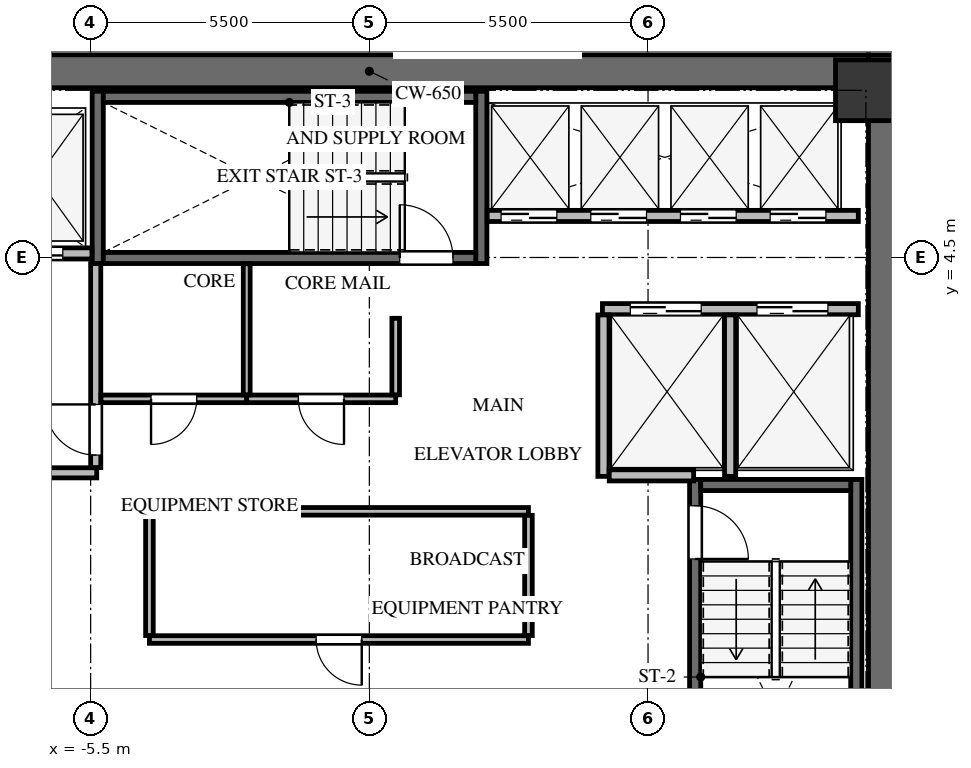
"""IFC4 building model, lengths in metres.
Left out: names, types, materials, properties, quantities, classifications, styles, units other than length and angle.
Written with IfcOpenShell. Run it as: python <this file> out.ifc"""

import sys

from ifc_helpers import new_model, si_unit, direction, frame, frame_2d, origin, origin_2d, place, context, subcontext, project, spatial, rectangle, extrude, source, transform, mapped, element, fill, save


model = new_model("IFC4")
c1 = context("Model", 3, precision=1e-05, world=origin(), true_north=direction((0.0, 1.0)))
c2 = subcontext(c1, "Body", "Model", "MODEL_VIEW")
j1 = project(units=[si_unit("LENGTHUNIT", "METRE"), si_unit("PLANEANGLEUNIT", "RADIAN")], contexts=[c1])
p1 = place(None, origin())
s1 = spatial("IfcSite", under=j1, at=p1, CompositionType="ELEMENT")
p2 = place(p1, origin())
s2 = spatial("IfcBuilding", under=s1, at=p2, CompositionType="ELEMENT")
p3 = place(p2, frame((0.0, 0.0, 200.2)))
s3 = spatial("IfcBuildingStorey", under=s2, at=p3, CompositionType="ELEMENT", Elevation=200.2)
p4 = place(p3, frame((10.175, -8.5, 0.0), z_axis=(0.0, 0.0, 1.0), x_axis=(0.0, 1.0, 0.0)))
e1 = element("IfcWall", 1, at=p4, inside=s3, PredefinedType="SHEAR", context=c2, shape_type="SweptSolid", body=[
    extrude(rectangle(XDim=17.0, YDim=0.65, at=frame_2d((8.5, 0.0))), origin(), (0.0, 0.0, 1.0), 3.0),
])
p5 = place(p3, frame((-9.85, 8.175, 0.0), z_axis=(0.0, 0.0, 1.0), x_axis=(1.0, 0.0, 0.0)))
e2 = element("IfcWall", 2, at=p5, inside=s3, PredefinedType="SHEAR", context=c2, shape_type="SweptSolid", body=[
    extrude(rectangle(XDim=19.7, YDim=0.65, at=frame_2d((9.85, 0.0))), origin(), (0.0, 0.0, 1.0), 3.0),
])
p6 = place(p3, frame((9.61, -7.77, -0.24), z_axis=(0.0, 0.0, 1.0), x_axis=(0.0, 1.0, 0.0)))
e3 = element("IfcWall", 3, at=p6, inside=s3, PredefinedType="SHEAR", context=c2, shape_type="SweptSolid", body=[
    extrude(rectangle(XDim=7.89, YDim=0.22, at=frame_2d((3.945, 0.0))), origin(), (0.0, 0.0, 1.0), 3.0),
])
p7 = place(p3, frame((6.43, 0.12, -0.24), z_axis=(0.0, 0.0, 1.0), x_axis=(0.0, -1.0, 0.0)))
e4 = element("IfcWall", 4, at=p7, inside=s3, PredefinedType="SHEAR", context=c2, shape_type="SweptSolid", body=[
    extrude(rectangle(XDim=7.89, YDim=0.22, at=frame_2d((3.945, 0.0))), origin(), (0.0, 0.0, 1.0), 3.0),
])
p8 = place(p7, frame((0.52, 0.0, 0.0)))
e5 = element("IfcOpeningElement", 5, at=p8, cuts=e4, PredefinedType="OPENING", context=c2, shape_type="SweptSolid", body=[
    extrude(rectangle(XDim=1.05, YDim=2.15, at=frame_2d((0.525, 1.075))), frame((0.0, 0.12, 0.0), z_axis=(0.0, -1.0, 0.0), x_axis=(1.0, 0.0, 0.0)), (0.0, 0.0, 1.0), 0.24),
])
p9 = place(p3, frame((9.5, 0.01, -0.24), z_axis=(0.0, 0.0, 1.0), x_axis=(-1.0, 0.0, 0.0)))
e6 = element("IfcWall", 6, at=p9, inside=s3, PredefinedType="SHEAR", context=c2, shape_type="SweptSolid", body=[
    extrude(rectangle(XDim=2.96, YDim=0.22, at=frame_2d((1.48, 0.0))), origin(), (0.0, 0.0, 1.0), 3.0),
])
for number, where, z_axis, x_axis in (
    (7, (2.21, 4.38, -0.24), (0.0, 0.0, 1.0), (0.0, 1.0, 0.0)),
    (8, (-5.36, 7.78, -0.24), (0.0, 0.0, 1.0), (0.0, -1.0, 0.0)),
):
    element("IfcWall", number, at=place(p3, frame(where, z_axis=z_axis, x_axis=x_axis)), inside=s3, PredefinedType="SHEAR", context=c2, shape_type="SweptSolid", body=[
        extrude(rectangle(XDim=3.4, YDim=0.22, at=frame_2d((1.7, 0.0))), origin(), (0.0, 0.0, 1.0), 3.0),
    ])
p10 = place(p3, frame((-5.25, 4.49, -0.24), z_axis=(0.0, 0.0, 1.0), x_axis=(1.0, 0.0, 0.0)))
e9 = element("IfcWall", 9, at=p10, inside=s3, PredefinedType="SHEAR", context=c2, shape_type="SweptSolid", body=[
    extrude(rectangle(XDim=7.35, YDim=0.22, at=frame_2d((3.675, 0.0))), origin(), (0.0, 0.0, 1.0), 3.0),
])
p11 = place(p10, frame((5.85, 0.0, 0.0)))
e10 = element("IfcOpeningElement", 10, at=p11, cuts=e9, PredefinedType="OPENING", context=c2, shape_type="SweptSolid", body=[
    extrude(rectangle(XDim=1.05, YDim=2.15, at=frame_2d((0.525, 1.075))), frame((0.0, 0.12, 0.0), z_axis=(0.0, -1.0, 0.0), x_axis=(1.0, 0.0, 0.0)), (0.0, 0.0, 1.0), 0.24),
])
p12 = place(p3, frame((2.1, 7.67, -0.24), z_axis=(0.0, 0.0, 1.0), x_axis=(-1.0, 0.0, 0.0)))
e11 = element("IfcWall", 11, at=p12, inside=s3, PredefinedType="SHEAR", context=c2, shape_type="SweptSolid", body=[
    extrude(rectangle(XDim=7.35, YDim=0.22, at=frame_2d((3.675, 0.0))), origin(), (0.0, 0.0, 1.0), 3.0),
])
m1 = source(origin(), c2, "Body", "SweptSolid", [
    extrude(rectangle(XDim=1.2, YDim=1.2, at=origin_2d()), origin(), (0.0, 0.0, 1.0), 3.0),
])
p13 = place(p3, frame((9.8, 7.8, -0.24), z_axis=(0.0, 0.0, 1.0), x_axis=(1.0, 0.0, 0.0)))
e12 = element("IfcColumn", 12, at=p13, inside=s3, PredefinedType="COLUMN", context=c2, shape_type="MappedRepresentation", body=[
    mapped(m1, transform((0.0, 0.0, 0.0), x_axis=(1.0, 0.0, 0.0), y_axis=(0.0, 1.0, 0.0), z_axis=(0.0, 0.0, 1.0), scale=1.0)),
])
p14 = place(p3, frame((-9.65, 4.58, 0.0), z_axis=(0.0, 0.0, 1.0), x_axis=(1.0, 0.0, 0.0)))
e13 = element("IfcWall", 13, at=p14, inside=s3, PredefinedType="SOLIDWALL", context=c2, shape_type="SweptSolid", body=[
    extrude(rectangle(XDim=4.175, YDim=0.22, at=frame_2d((2.087, 0.0))), origin(), (0.0, 0.0, 1.0), 2.745),
])
p15 = place(p14, frame((0.4, 0.0, 0.0)))
e14 = element("IfcOpeningElement", 14, at=p15, cuts=e13, PredefinedType="OPENING", context=c2, shape_type="SweptSolid", body=[
    extrude(rectangle(XDim=1.2, YDim=2.15, at=frame_2d((0.6, 1.075))), frame((0.0, 0.12, 0.0), z_axis=(0.0, -1.0, 0.0), x_axis=(1.0, 0.0, 0.0)), (0.0, 0.0, 1.0), 0.24),
])
p16 = place(p14, frame((2.4, 0.0, 0.0)))
e15 = element("IfcOpeningElement", 15, at=p16, cuts=e13, PredefinedType="OPENING", context=c2, shape_type="SweptSolid", body=[
    extrude(rectangle(XDim=1.2, YDim=2.15, at=frame_2d((0.6, 1.075))), frame((0.0, 0.12, 0.0), z_axis=(0.0, -1.0, 0.0), x_axis=(1.0, 0.0, 0.0)), (0.0, 0.0, 1.0), 0.24),
])
p17 = place(p3, frame((-9.65, 0.25, 0.0), z_axis=(0.0, 0.0, 1.0), x_axis=(1.0, 0.0, 0.0)))
e16 = element("IfcWall", 16, at=p17, inside=s3, PredefinedType="SOLIDWALL", context=c2, shape_type="SweptSolid", body=[
    extrude(rectangle(XDim=4.27, YDim=0.2, at=frame_2d((2.135, 0.0))), origin(), (0.0, 0.0, 1.0), 2.745),
])
p18 = place(p3, frame((-5.4, 0.354, 0.0), z_axis=(0.0, 0.0, 1.0), x_axis=(0.0, 1.0, 0.0)))
e17 = element("IfcWall", 17, at=p18, inside=s3, PredefinedType="SOLIDWALL", context=c2, shape_type="SweptSolid", body=[
    extrude(rectangle(XDim=4.026, YDim=0.2, at=frame_2d((2.013, 0.0))), origin(), (0.0, 0.0, 1.0), 2.745),
])
p19 = place(p18, frame((0.246, 0.0, 0.0)))
e18 = element("IfcOpeningElement", 18, at=p19, cuts=e17, PredefinedType="OPENING", context=c2, shape_type="SweptSolid", body=[
    extrude(rectangle(XDim=1.0, YDim=2.15, at=frame_2d((0.5, 1.075))), frame((0.0, 0.11, 0.0), z_axis=(0.0, -1.0, 0.0), x_axis=(1.0, 0.0, 0.0)), (0.0, 0.0, 1.0), 0.22),
])
p20 = place(p3, frame((4.6, 3.48, 0.0), z_axis=(0.0, 0.0, 1.0), x_axis=(1.0, 0.0, 0.0)))
e19 = element("IfcWall", 19, at=p20, inside=s3, PredefinedType="SOLIDWALL", context=c2, shape_type="SweptSolid", body=[
    extrude(rectangle(XDim=5.05, YDim=0.22, at=frame_2d((2.525, 0.0))), origin(), (0.0, 0.0, 1.0), 2.745),
])
p21 = place(p20, frame((0.55, 0.0, 0.0)))
e20 = element("IfcOpeningElement", 20, at=p21, cuts=e19, PredefinedType="OPENING", context=c2, shape_type="SweptSolid", body=[
    extrude(rectangle(XDim=1.4, YDim=2.15, at=frame_2d((0.7, 1.075))), frame((0.0, 0.12, 0.0), z_axis=(0.0, -1.0, 0.0), x_axis=(1.0, 0.0, 0.0)), (0.0, 0.0, 1.0), 0.24),
])
p22 = place(p20, frame((3.05, 0.0, 0.0)))
e21 = element("IfcOpeningElement", 21, at=p22, cuts=e19, PredefinedType="OPENING", context=c2, shape_type="SweptSolid", body=[
    extrude(rectangle(XDim=1.4, YDim=2.15, at=frame_2d((0.7, 1.075))), frame((0.0, 0.12, 0.0), z_axis=(0.0, -1.0, 0.0), x_axis=(1.0, 0.0, 0.0)), (0.0, 0.0, 1.0), 0.24),
])
for number, where, z_axis, x_axis in (
    (22, (4.62, 0.18, 0.0), (0.0, 0.0, 1.0), (0.0, 1.0, 0.0)),
    (23, (7.12, 0.18, 0.0), (0.0, 0.0, 1.0), (0.0, 1.0, 0.0)),
):
    element("IfcWall", number, at=place(p3, frame(where, z_axis=z_axis, x_axis=x_axis)), inside=s3, PredefinedType="SOLIDWALL", context=c2, shape_type="SweptSolid", body=[
        extrude(rectangle(XDim=3.186, YDim=0.22, at=frame_2d((1.593, 0.0))), origin(), (0.0, 0.0, 1.0), 2.745),
    ])
p23 = place(p3, frame((4.734, 0.2, 0.0), z_axis=(0.0, 0.0, 1.0), x_axis=(1.0, 0.0, 0.0)))
e24 = element("IfcWall", 24, at=p23, inside=s3, PredefinedType="SOLIDWALL", context=c2, shape_type="SweptSolid", body=[
    extrude(rectangle(XDim=1.666, YDim=0.22, at=frame_2d((0.833, 0.0))), origin(), (0.0, 0.0, 1.0), 2.745),
])
p24 = place(p3, frame((2.325, 5.32, 0.0), z_axis=(0.0, 0.0, 1.0), x_axis=(1.0, 0.0, 0.0)))
e25 = element("IfcWall", 25, at=p24, inside=s3, PredefinedType="SOLIDWALL", context=c2, shape_type="SweptSolid", body=[
    extrude(rectangle(XDim=7.325, YDim=0.22, at=frame_2d((3.663, 0.0))), origin(), (0.0, 0.0, 1.0), 2.745),
])
p25 = place(p24, frame((0.275, 0.0, 0.0)))
e26 = element("IfcOpeningElement", 26, at=p25, cuts=e25, PredefinedType="OPENING", context=c2, shape_type="SweptSolid", body=[
    extrude(rectangle(XDim=1.1, YDim=2.15, at=frame_2d((0.55, 1.075))), frame((0.0, 0.12, 0.0), z_axis=(0.0, -1.0, 0.0), x_axis=(1.0, 0.0, 0.0)), (0.0, 0.0, 1.0), 0.24),
])
p26 = place(p24, frame((2.045, 0.0, 0.0)))
e27 = element("IfcOpeningElement", 27, at=p26, cuts=e25, PredefinedType="OPENING", context=c2, shape_type="SweptSolid", body=[
    extrude(rectangle(XDim=1.1, YDim=2.15, at=frame_2d((0.55, 1.075))), frame((0.0, 0.12, 0.0), z_axis=(0.0, -1.0, 0.0), x_axis=(1.0, 0.0, 0.0)), (0.0, 0.0, 1.0), 0.24),
])
p27 = place(p24, frame((3.815, 0.0, 0.0)))
e28 = element("IfcOpeningElement", 28, at=p27, cuts=e25, PredefinedType="OPENING", context=c2, shape_type="SweptSolid", body=[
    extrude(rectangle(XDim=1.1, YDim=2.15, at=frame_2d((0.55, 1.075))), frame((0.0, 0.12, 0.0), z_axis=(0.0, -1.0, 0.0), x_axis=(1.0, 0.0, 0.0)), (0.0, 0.0, 1.0), 0.24),
])
p28 = place(p24, frame((5.585, 0.0, 0.0)))
e29 = element("IfcOpeningElement", 29, at=p28, cuts=e25, PredefinedType="OPENING", context=c2, shape_type="SweptSolid", body=[
    extrude(rectangle(XDim=1.1, YDim=2.15, at=frame_2d((0.55, 1.075))), frame((0.0, 0.12, 0.0), z_axis=(0.0, -1.0, 0.0), x_axis=(1.0, 0.0, 0.0)), (0.0, 0.0, 1.0), 0.24),
])
p29 = place(p3, frame((3.14, -3.04, 0.0), z_axis=(0.0, 0.0, 1.0), x_axis=(-1.0, 0.0, 0.0)))
e30 = element("IfcWall", 30, at=p29, inside=s3, PredefinedType="PARTITIONING", context=c2, shape_type="SweptSolid", body=[
    extrude(rectangle(XDim=7.48, YDim=0.15, at=frame_2d((3.74, 0.0))), origin(), (0.0, 0.0, 1.0), 2.745),
])
p30 = place(p29, frame((3.29, 0.0, 0.0)))
e31 = element("IfcOpeningElement", 31, at=p30, cuts=e30, PredefinedType="OPENING", context=c2, shape_type="SweptSolid", body=[
    extrude(rectangle(XDim=0.9, YDim=2.05, at=frame_2d((0.45, 1.025))), frame((0.0, 0.085, 0.0), z_axis=(0.0, -1.0, 0.0), x_axis=(1.0, 0.0, 0.0)), (0.0, 0.0, 1.0), 0.17),
])
p31 = place(p3, frame((-4.34, -0.51, 0.0), z_axis=(0.0, 0.0, 1.0), x_axis=(1.0, 0.0, 0.0)))
e32 = element("IfcWall", 32, at=p31, inside=s3, PredefinedType="PARTITIONING", context=c2, shape_type="SweptSolid", body=[
    extrude(rectangle(XDim=7.48, YDim=0.15, at=frame_2d((3.74, 0.0))), origin(), (0.0, 0.0, 1.0), 2.745),
])
for number, where, z_axis, x_axis in (
    (33, (-4.34, -2.961, 0.0), (0.0, 0.0, 1.0), (0.0, 1.0, 0.0)),
    (34, (3.14, -0.589, 0.0), (0.0, 0.0, 1.0), (0.0, -1.0, 0.0)),
):
    element("IfcWall", number, at=place(p3, frame(where, z_axis=z_axis, x_axis=x_axis)), inside=s3, PredefinedType="PARTITIONING", context=c2, shape_type="SweptSolid", body=[
        extrude(rectangle(XDim=2.372, YDim=0.15, at=frame_2d((1.186, 0.0))), origin(), (0.0, 0.0, 1.0), 2.745),
    ])
p32 = place(p3, frame((-2.42, 1.71, 0.0), z_axis=(0.0, 0.0, 1.0), x_axis=(-1.0, 0.0, 0.0)))
e35 = element("IfcWall", 35, at=p32, inside=s3, PredefinedType="PARTITIONING", context=c2, shape_type="SweptSolid", body=[
    extrude(rectangle(XDim=2.876, YDim=0.15, at=frame_2d((1.438, 0.0))), origin(), (0.0, 0.0, 1.0), 2.745),
])
p33 = place(p32, frame((0.988, 0.0, 0.0)))
e36 = element("IfcOpeningElement", 36, at=p33, cuts=e35, PredefinedType="OPENING", context=c2, shape_type="SweptSolid", body=[
    extrude(rectangle(XDim=0.9, YDim=2.05, at=frame_2d((0.45, 1.025))), frame((0.0, 0.085, 0.0), z_axis=(0.0, -1.0, 0.0), x_axis=(1.0, 0.0, 0.0)), (0.0, 0.0, 1.0), 0.17),
])
p34 = place(p3, frame((0.52, 1.71, 0.0), z_axis=(0.0, 0.0, 1.0), x_axis=(-1.0, 0.0, 0.0)))
e37 = element("IfcWall", 37, at=p34, inside=s3, PredefinedType="PARTITIONING", context=c2, shape_type="SweptSolid", body=[
    extrude(rectangle(XDim=2.94, YDim=0.15, at=frame_2d((1.47, 0.0))), origin(), (0.0, 0.0, 1.0), 2.745),
])
p35 = place(p34, frame((1.02, 0.0, 0.0)))
e38 = element("IfcOpeningElement", 38, at=p35, cuts=e37, PredefinedType="OPENING", context=c2, shape_type="SweptSolid", body=[
    extrude(rectangle(XDim=0.9, YDim=2.05, at=frame_2d((0.45, 1.025))), frame((0.0, 0.085, 0.0), z_axis=(0.0, -1.0, 0.0), x_axis=(1.0, 0.0, 0.0)), (0.0, 0.0, 1.0), 0.17),
])
p36 = place(p3, frame((0.52, 3.3, 0.0), z_axis=(0.0, 0.0, 1.0), x_axis=(0.0, -1.0, 0.0)))
e39 = element("IfcWall", 39, at=p36, inside=s3, PredefinedType="PARTITIONING", context=c2, shape_type="SweptSolid", body=[
    extrude(rectangle(XDim=1.511, YDim=0.15, at=frame_2d((0.755, 0.0))), origin(), (0.0, 0.0, 1.0), 2.745),
])
p37 = place(p3, frame((-2.42, 4.375, 0.0), z_axis=(0.0, 0.0, 1.0), x_axis=(0.0, -1.0, 0.0)))
e40 = element("IfcWall", 40, at=p37, inside=s3, PredefinedType="PARTITIONING", context=c2, shape_type="SweptSolid", body=[
    extrude(rectangle(XDim=2.586, YDim=0.135, at=frame_2d((1.293, 0.0))), origin(), (0.0, 0.0, 1.0), 2.745),
])
m2 = source(origin(), c2, "Body", "SweptSolid", [
    extrude(rectangle(XDim=1.05, YDim=2.15, at=frame_2d((0.525, 1.075))), frame((0.0, 0.025, 0.0), z_axis=(0.0, -1.0, 0.0), x_axis=(1.0, 0.0, 0.0)), (0.0, 0.0, 1.0), 0.05),
])
p38 = place(p8, origin())
e41 = element("IfcDoor", 41, at=p38, inside=s3, OperationType="SINGLE_SWING_RIGHT", PredefinedType="DOOR", context=c2, shape_type="MappedRepresentation", body=[
    mapped(m2, transform((0.0, 0.0, 0.0), x_axis=(1.0, 0.0, 0.0), y_axis=(0.0, 1.0, 0.0), z_axis=(0.0, 0.0, 1.0), scale=1.0)),
])
fill(e5, e41)
m3 = source(origin(), c2, "Body", "SweptSolid", [
    extrude(rectangle(XDim=1.05, YDim=2.15, at=frame_2d((0.525, 1.075))), frame((0.0, 0.025, 0.0), z_axis=(0.0, -1.0, 0.0), x_axis=(1.0, 0.0, 0.0)), (0.0, 0.0, 1.0), 0.05),
])
p39 = place(p11, origin())
e42 = element("IfcDoor", 42, at=p39, inside=s3, OperationType="SINGLE_SWING_LEFT", PredefinedType="DOOR", context=c2, shape_type="MappedRepresentation", body=[
    mapped(m3, transform((0.0, 0.0, 0.0), x_axis=(1.0, 0.0, 0.0), y_axis=(0.0, 1.0, 0.0), z_axis=(0.0, 0.0, 1.0), scale=1.0)),
])
fill(e10, e42)
m4 = source(origin(), c2, "Body", "SweptSolid", [
    extrude(rectangle(XDim=1.2, YDim=2.15, at=frame_2d((0.6, 1.075))), frame((0.0, 0.025, 0.0), z_axis=(0.0, -1.0, 0.0), x_axis=(1.0, 0.0, 0.0)), (0.0, 0.0, 1.0), 0.05),
])
p40 = place(p16, origin())
e43 = element("IfcDoor", 43, at=p40, inside=s3, OperationType="DOUBLE_DOOR_SLIDING", PredefinedType="DOOR", context=c2, shape_type="MappedRepresentation", body=[
    mapped(m4, transform((0.0, 0.0, 0.0), x_axis=(1.0, 0.0, 0.0), y_axis=(0.0, 1.0, 0.0), z_axis=(0.0, 0.0, 1.0), scale=1.0)),
])
fill(e15, e43)
m5 = source(origin(), c2, "Body", "SweptSolid", [
    extrude(rectangle(XDim=1.0, YDim=2.15, at=frame_2d((0.5, 1.075))), frame((0.0, 0.025, 0.0), z_axis=(0.0, -1.0, 0.0), x_axis=(1.0, 0.0, 0.0)), (0.0, 0.0, 1.0), 0.05),
])
p41 = place(p19, origin())
e44 = element("IfcDoor", 44, at=p41, inside=s3, OperationType="SINGLE_SWING_RIGHT", PredefinedType="DOOR", context=c2, shape_type="MappedRepresentation", body=[
    mapped(m5, transform((0.0, 0.0, 0.0), x_axis=(1.0, 0.0, 0.0), y_axis=(0.0, 1.0, 0.0), z_axis=(0.0, 0.0, 1.0), scale=1.0)),
])
fill(e18, e44)
m6 = source(origin(), c2, "Body", "SweptSolid", [
    extrude(rectangle(XDim=1.4, YDim=2.15, at=frame_2d((0.7, 1.075))), frame((0.0, 0.025, 0.0), z_axis=(0.0, -1.0, 0.0), x_axis=(1.0, 0.0, 0.0)), (0.0, 0.0, 1.0), 0.05),
])
p42 = place(p21, origin())
e45 = element("IfcDoor", 45, at=p42, inside=s3, OperationType="DOUBLE_DOOR_SLIDING", PredefinedType="DOOR", context=c2, shape_type="MappedRepresentation", body=[
    mapped(m6, transform((0.0, 0.0, 0.0), x_axis=(1.0, 0.0, 0.0), y_axis=(0.0, 1.0, 0.0), z_axis=(0.0, 0.0, 1.0), scale=1.0)),
])
fill(e20, e45)
p43 = place(p22, origin())
e46 = element("IfcDoor", 46, at=p43, inside=s3, OperationType="DOUBLE_DOOR_SLIDING", PredefinedType="DOOR", context=c2, shape_type="MappedRepresentation", body=[
    mapped(m6, transform((0.0, 0.0, 0.0), x_axis=(1.0, 0.0, 0.0), y_axis=(0.0, 1.0, 0.0), z_axis=(0.0, 0.0, 1.0), scale=1.0)),
])
fill(e21, e46)
m7 = source(origin(), c2, "Body", "SweptSolid", [
    extrude(rectangle(XDim=1.1, YDim=2.15, at=frame_2d((0.55, 1.075))), frame((0.0, 0.025, 0.0), z_axis=(0.0, -1.0, 0.0), x_axis=(1.0, 0.0, 0.0)), (0.0, 0.0, 1.0), 0.05),
])
p44 = place(p25, origin())
e47 = element("IfcDoor", 47, at=p44, inside=s3, OperationType="DOUBLE_DOOR_SLIDING", PredefinedType="DOOR", context=c2, shape_type="MappedRepresentation", body=[
    mapped(m7, transform((0.0, 0.0, 0.0), x_axis=(1.0, 0.0, 0.0), y_axis=(0.0, 1.0, 0.0), z_axis=(0.0, 0.0, 1.0), scale=1.0)),
])
fill(e26, e47)
p45 = place(p26, origin())
e48 = element("IfcDoor", 48, at=p45, inside=s3, OperationType="DOUBLE_DOOR_SLIDING", PredefinedType="DOOR", context=c2, shape_type="MappedRepresentation", body=[
    mapped(m7, transform((0.0, 0.0, 0.0), x_axis=(1.0, 0.0, 0.0), y_axis=(0.0, 1.0, 0.0), z_axis=(0.0, 0.0, 1.0), scale=1.0)),
])
fill(e27, e48)
p46 = place(p27, origin())
e49 = element("IfcDoor", 49, at=p46, inside=s3, OperationType="DOUBLE_DOOR_SLIDING", PredefinedType="DOOR", context=c2, shape_type="MappedRepresentation", body=[
    mapped(m7, transform((0.0, 0.0, 0.0), x_axis=(1.0, 0.0, 0.0), y_axis=(0.0, 1.0, 0.0), z_axis=(0.0, 0.0, 1.0), scale=1.0)),
])
fill(e28, e49)
p47 = place(p28, origin())
e50 = element("IfcDoor", 50, at=p47, inside=s3, OperationType="DOUBLE_DOOR_SLIDING", PredefinedType="DOOR", context=c2, shape_type="MappedRepresentation", body=[
    mapped(m7, transform((0.0, 0.0, 0.0), x_axis=(1.0, 0.0, 0.0), y_axis=(0.0, 1.0, 0.0), z_axis=(0.0, 0.0, 1.0), scale=1.0)),
])
fill(e29, e50)
m8 = source(origin(), c2, "Body", "SweptSolid", [
    extrude(rectangle(XDim=0.9, YDim=2.05, at=frame_2d((0.45, 1.025))), frame((0.0, 0.025, 0.0), z_axis=(0.0, -1.0, 0.0), x_axis=(1.0, 0.0, 0.0)), (0.0, 0.0, 1.0), 0.05),
])
p48 = place(p30, origin())
e51 = element("IfcDoor", 51, at=p48, inside=s3, OperationType="SINGLE_SWING_LEFT", PredefinedType="DOOR", context=c2, shape_type="MappedRepresentation", body=[
    mapped(m8, transform((0.0, 0.0, 0.0), x_axis=(1.0, 0.0, 0.0), y_axis=(0.0, 1.0, 0.0), z_axis=(0.0, 0.0, 1.0), scale=1.0)),
])
fill(e31, e51)
m9 = source(origin(), c2, "Body", "SweptSolid", [
    extrude(rectangle(XDim=0.9, YDim=2.05, at=frame_2d((0.45, 1.025))), frame((0.0, 0.025, 0.0), z_axis=(0.0, -1.0, 0.0), x_axis=(1.0, 0.0, 0.0)), (0.0, 0.0, 1.0), 0.05),
])
p49 = place(p33, origin())
e52 = element("IfcDoor", 52, at=p49, inside=s3, OperationType="SINGLE_SWING_RIGHT", PredefinedType="DOOR", context=c2, shape_type="MappedRepresentation", body=[
    mapped(m9, transform((0.0, 0.0, 0.0), x_axis=(1.0, 0.0, 0.0), y_axis=(0.0, 1.0, 0.0), z_axis=(0.0, 0.0, 1.0), scale=1.0)),
])
fill(e36, e52)
p50 = place(p35, origin())
e53 = element("IfcDoor", 53, at=p50, inside=s3, OperationType="SINGLE_SWING_LEFT", PredefinedType="DOOR", context=c2, shape_type="MappedRepresentation", body=[
    mapped(m8, transform((0.0, 0.0, 0.0), x_axis=(1.0, 0.0, 0.0), y_axis=(0.0, 1.0, 0.0), z_axis=(0.0, 0.0, 1.0), scale=1.0)),
])
fill(e38, e53)
save(model, sys.argv[1])
